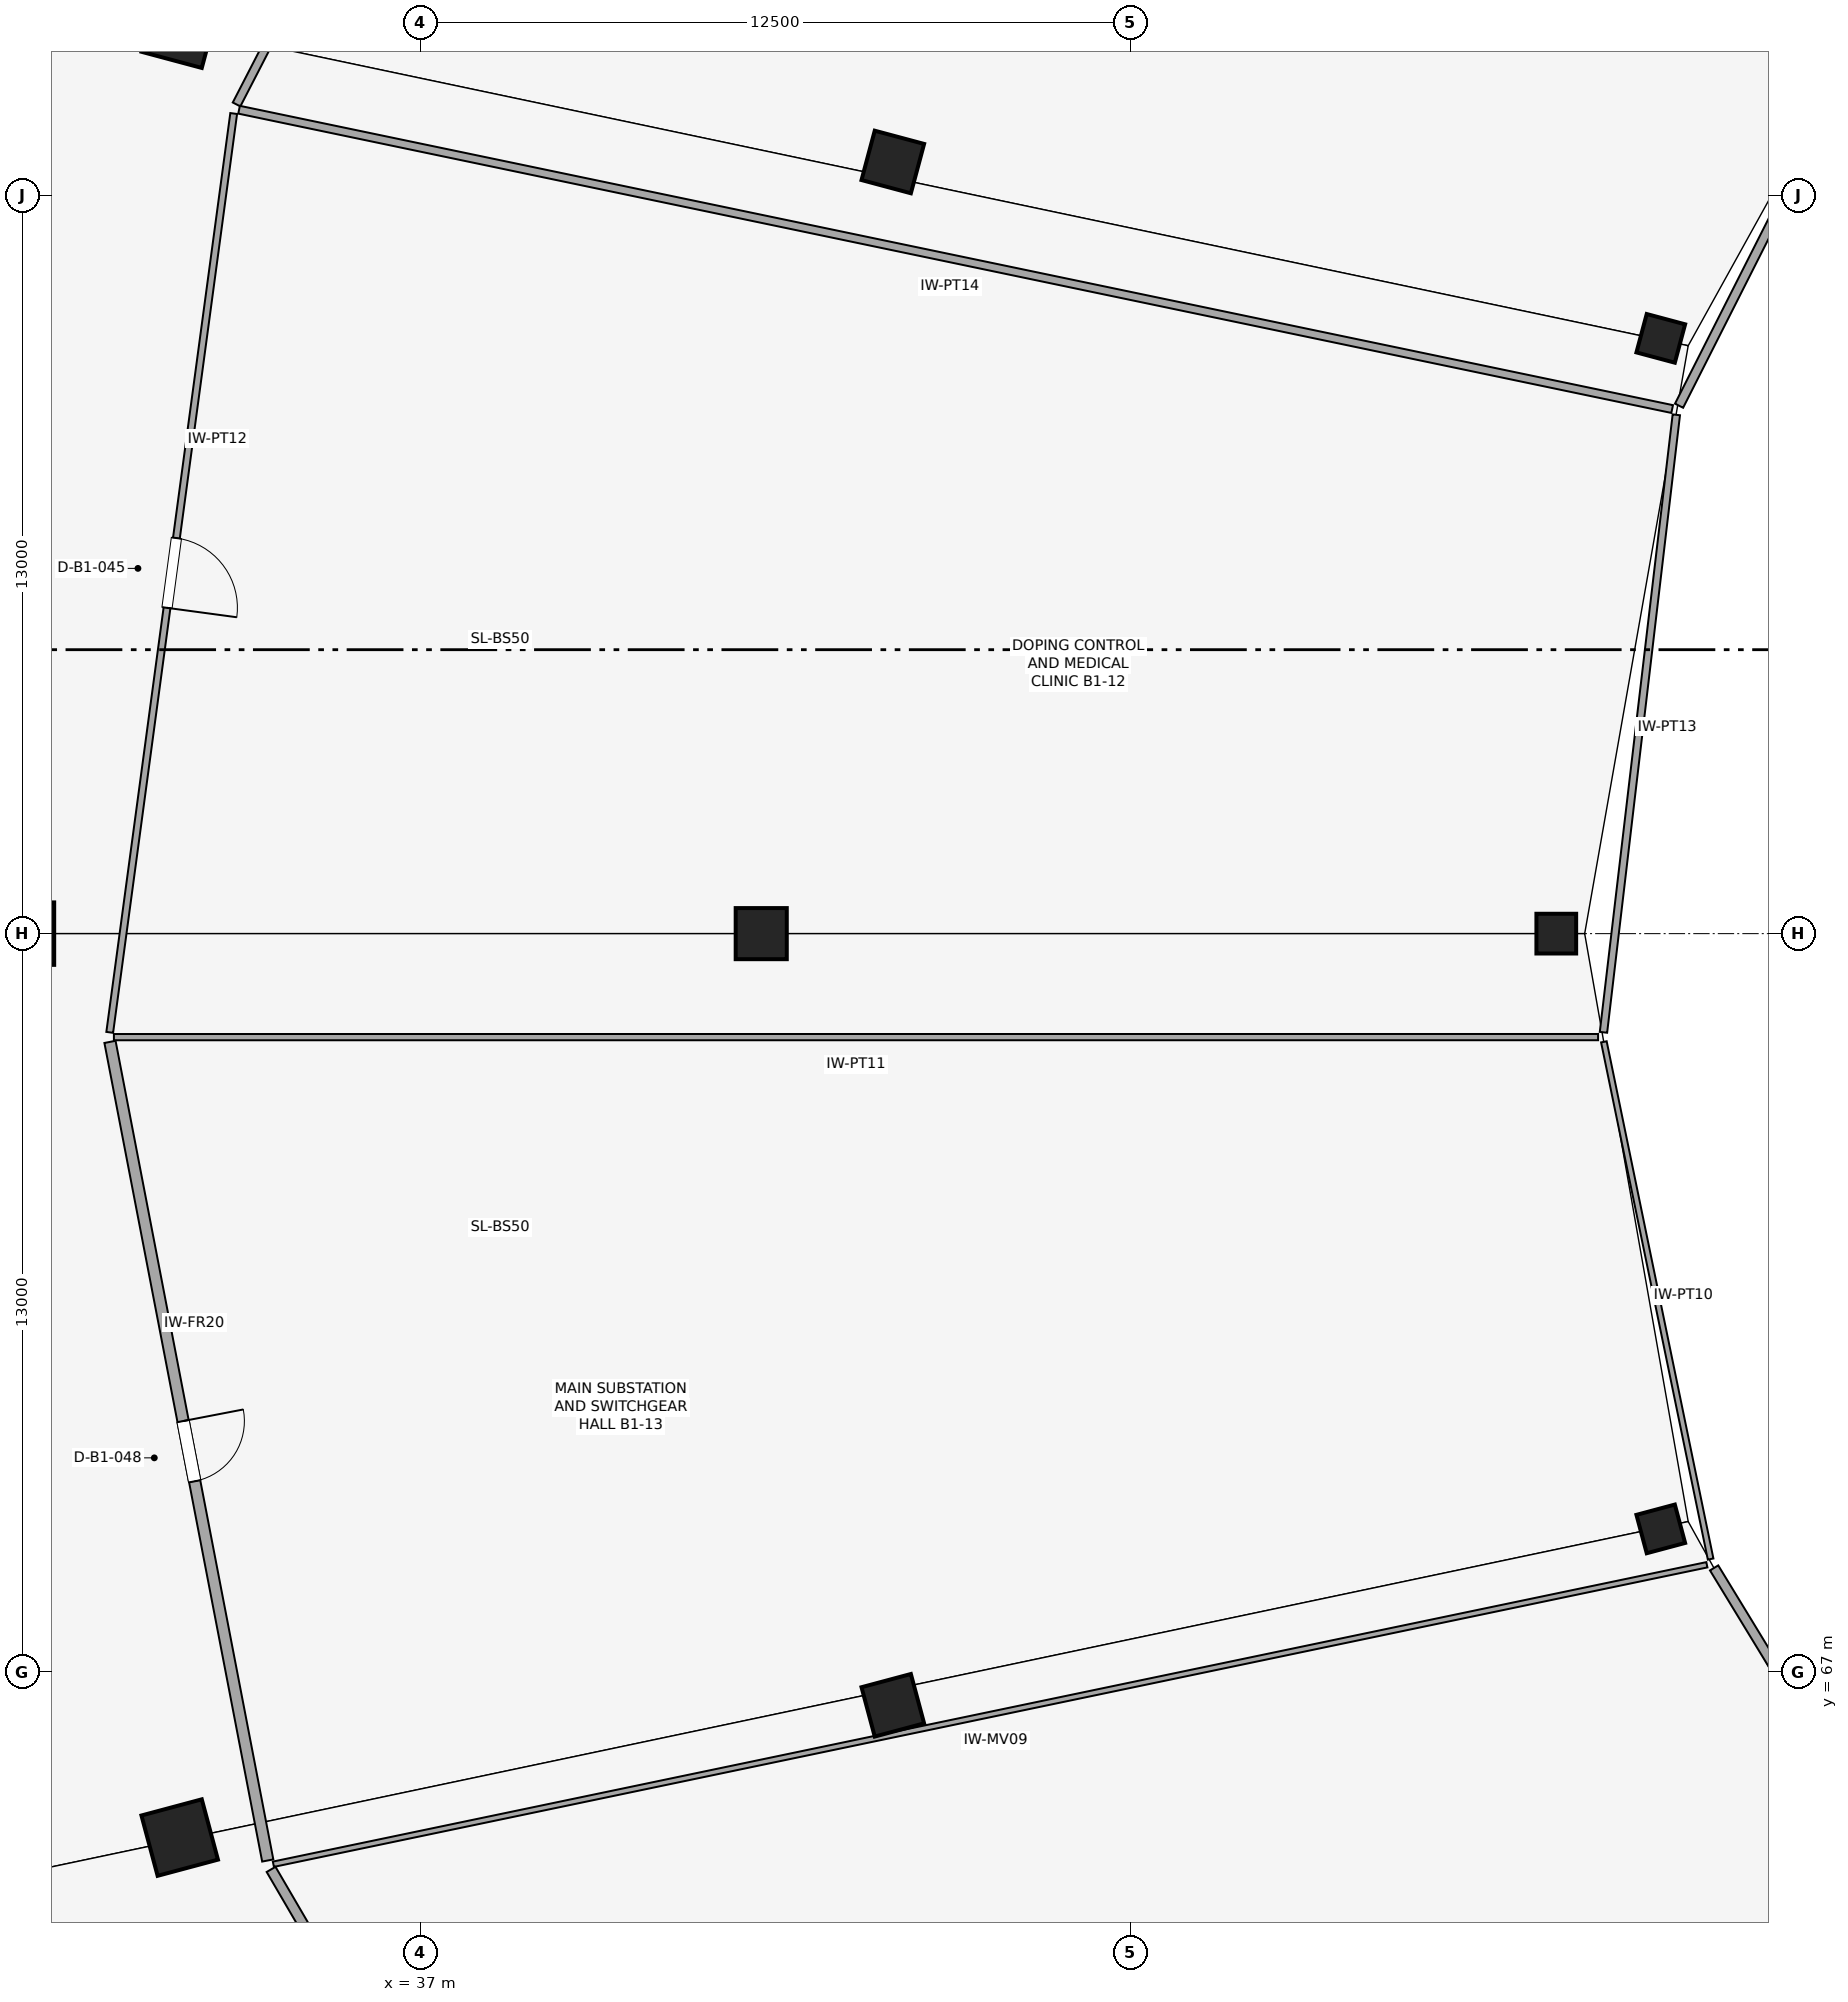
"""IFC4 building model, lengths in metres.
Left out: names, types, materials, properties, quantities, classifications, styles, units other than length and angle.
Written with IfcOpenShell. Run it as: python <this file> out.ifc"""

import sys

from ifc_helpers import new_model, si_unit, direction, frame, frame_2d, origin, origin_2d, place, context, subcontext, project, spatial, rectangle, extrude, element, fill, save


model = new_model("IFC4")
c1 = context("Model", 3, precision=1e-05, world=origin(), true_north=direction((0.0, 1.0)))
c2 = subcontext(c1, "Body", "Model", "MODEL_VIEW")
j1 = project(units=[si_unit("LENGTHUNIT", "METRE"), si_unit("PLANEANGLEUNIT", "RADIAN")], contexts=[c1])
p1 = place(None, origin())
s1 = spatial("IfcSite", under=j1, at=p1, CompositionType="ELEMENT")
p2 = place(p1, origin())
s2 = spatial("IfcBuilding", under=s1, at=p2, CompositionType="ELEMENT")
p3 = place(p2, frame((0.0, 0.0, -5.4)))
s3 = spatial("IfcBuildingStorey", under=s2, at=p3, CompositionType="ELEMENT", Elevation=-5.4)
for number, where, z_axis, x_axis in (
    (1, (58.84, 90.482, 0.0), (0.0, 0.0, 1.0), (-0.966, 0.259, 0.0)),
    (2, (57.0, 80.0, 0.0), (0.0, 0.0, 1.0), (-1.0, 0.0, 0.0)),
    (3, (58.84, 69.518, 0.0), (0.0, 0.0, 1.0), (-0.966, -0.259, 0.0)),
):
    element("IfcColumn", number, at=place(p3, frame(where, z_axis=z_axis, x_axis=x_axis)), inside=s3, PredefinedType="COLUMN", context=c2, shape_type="SweptSolid", body=[
        extrude(rectangle(XDim=0.7, YDim=0.7, at=origin_2d()), origin(), (0.0, 0.0, 1.0), 5.4),
    ])
for number, where, z_axis, x_axis in (
    (4, (45.317, 93.588, 0.0), (0.0, 0.0, 1.0), (-0.966, 0.259, 0.0)),
    (5, (43.0, 80.0, 0.0), (0.0, 0.0, 1.0), (-1.0, 0.0, 0.0)),
    (6, (45.317, 66.412, 0.0), (0.0, 0.0, 1.0), (-0.966, -0.259, 0.0)),
):
    element("IfcColumn", number, at=place(p3, frame(where, z_axis=z_axis, x_axis=x_axis)), inside=s3, PredefinedType="COLUMN", context=c2, shape_type="SweptSolid", body=[
        extrude(rectangle(XDim=0.9, YDim=0.9, at=origin_2d()), origin(), (0.0, 0.0, 1.0), 5.4),
    ])
for number, where, z_axis, x_axis in (
    (7, (32.76, 95.917, 0.0), (0.0, 0.0, 1.0), (-0.966, 0.259, 0.0)),
    (8, (30.0, 80.0, 0.0), (0.0, 0.0, 1.0), (-1.0, 0.0, 0.0)),
    (9, (32.76, 64.083, 0.0), (0.0, 0.0, 1.0), (-0.966, -0.259, 0.0)),
):
    element("IfcColumn", number, at=place(p3, frame(where, z_axis=z_axis, x_axis=x_axis)), inside=s3, PredefinedType="COLUMN", context=c2, shape_type="SweptSolid", body=[
        extrude(rectangle(XDim=1.1, YDim=1.1, at=origin_2d()), origin(), (0.0, 0.0, 1.0), 5.4),
    ])
p4 = place(p3, frame((63.563, 98.0, 0.0), z_axis=(0.0, 0.0, 1.0), x_axis=(-0.451234278817, -0.892405527561, 0.0)))
e10 = element("IfcWall", 10, at=p4, inside=s3, PredefinedType="PARTITIONING", context=c2, shape_type="SweptSolid", body=[
    extrude(rectangle(XDim=9.753, YDim=0.16, at=frame_2d((4.876, 0.0))), origin(), (0.0, 0.0, 1.0), 3.8),
])
p5 = place(p3, frame((40.797, 108.244, 0.0), z_axis=(0.0, 0.0, 1.0), x_axis=(-0.458369031368, -0.888761965367, 0.0)))
e11 = element("IfcWall", 11, at=p5, inside=s3, PredefinedType="PARTITIONING", context=c2, shape_type="SweptSolid", body=[
    extrude(rectangle(XDim=15.35, YDim=0.15, at=frame_2d((7.675, 0.0))), origin(), (0.0, 0.0, 1.0), 3.8),
])
p6 = place(p5, frame((7.165, 0.0, 0.0)))
e12 = element("IfcOpeningElement", 12, at=p6, cuts=e11, PredefinedType="OPENING", context=c2, shape_type="SweptSolid", body=[
    extrude(rectangle(XDim=1.02, YDim=2.38, at=frame_2d((0.51, 1.19))), frame((0.0, 0.085, 0.0), z_axis=(0.0, -1.0, 0.0), x_axis=(1.0, 0.0, 0.0)), (0.0, 0.0, 1.0), 0.17),
])
p7 = place(p3, frame((59.04, 89.238, 0.0), z_axis=(0.0, 0.0, 1.0), x_axis=(-0.978875817895, 0.204455699701, 0.0)))
e13 = element("IfcWall", 13, at=p7, inside=s3, PredefinedType="PARTITIONING", context=c2, shape_type="SweptSolid", body=[
    extrude(rectangle(XDim=25.78, YDim=0.14, at=frame_2d((12.89, 0.0))), origin(), (0.0, 0.0, 1.0), 3.8),
])
p8 = place(p3, frame((59.114, 89.136, 0.0), z_axis=(0.0, 0.0, 1.0), x_axis=(-0.117156923081, -0.993113415162, 0.0)))
e14 = element("IfcWall", 14, at=p8, inside=s3, PredefinedType="PARTITIONING", context=c2, shape_type="SweptSolid", body=[
    extrude(rectangle(XDim=10.949, YDim=0.13, at=frame_2d((5.474, 0.0))), origin(), (0.0, 0.0, 1.0), 3.8),
])
p9 = place(p3, frame((33.711, 94.441, 0.0), z_axis=(0.0, 0.0, 1.0), x_axis=(-0.133715075634, -0.991019817435, 0.0)))
e15 = element("IfcWall", 15, at=p9, inside=s3, PredefinedType="PARTITIONING", context=c2, shape_type="SweptSolid", body=[
    extrude(rectangle(XDim=16.327, YDim=0.12, at=frame_2d((8.163, 0.0))), origin(), (0.0, 0.0, 1.0), 3.8),
])
p10 = place(p9, frame((7.543, 0.0, 0.0)))
e16 = element("IfcOpeningElement", 16, at=p10, cuts=e15, PredefinedType="OPENING", context=c2, shape_type="SweptSolid", body=[
    extrude(rectangle(XDim=1.24, YDim=2.24, at=frame_2d((0.62, 1.12))), frame((0.0, 0.07, 0.0), z_axis=(0.0, -1.0, 0.0), x_axis=(1.0, 0.0, 0.0)), (0.0, 0.0, 1.0), 0.14),
])
p11 = place(p3, frame((57.736, 78.178, 0.0), z_axis=(0.0, 0.0, 1.0), x_axis=(-0.999999999607, -2.8025335e-05, 0.0)))
e17 = element("IfcWall", 17, at=p11, inside=s3, PredefinedType="PARTITIONING", context=c2, shape_type="SweptSolid", body=[
    extrude(rectangle(XDim=26.134, YDim=0.11, at=frame_2d((13.067, 0.0))), origin(), (0.0, 0.0, 1.0), 3.8),
])
p12 = place(p3, frame((57.838, 78.095, 0.0), z_axis=(0.0, 0.0, 1.0), x_axis=(0.202140289415, -0.979356576225, 0.0)))
e18 = element("IfcWall", 18, at=p12, inside=s3, PredefinedType="PARTITIONING", context=c2, shape_type="SweptSolid", body=[
    extrude(rectangle(XDim=9.3, YDim=0.1, at=frame_2d((4.65, 0.0))), origin(), (0.0, 0.0, 1.0), 3.8),
])
p13 = place(p3, frame((31.533, 78.094, 0.0), z_axis=(0.0, 0.0, 1.0), x_axis=(0.189225499552, -0.981933658818, 0.0)))
e19 = element("IfcWall", 19, at=p13, inside=s3, PredefinedType="PARTITIONING", context=c2, shape_type="SweptSolid", body=[
    extrude(rectangle(XDim=14.68, YDim=0.2, at=frame_2d((7.34, 0.0))), origin(), (0.0, 0.0, 1.0), 3.8),
])
p14 = place(p13, frame((6.8, 0.0, 0.0)))
e20 = element("IfcOpeningElement", 20, at=p14, cuts=e19, PredefinedType="OPENING", context=c2, shape_type="SweptSolid", body=[
    extrude(rectangle(XDim=1.08, YDim=2.1, at=frame_2d((0.54, 1.05))), frame((0.0, 0.11, 0.0), z_axis=(0.0, -1.0, 0.0), x_axis=(1.0, 0.0, 0.0)), (0.0, 0.0, 1.0), 0.22),
])
p15 = place(p3, frame((59.652, 68.886, 0.0), z_axis=(0.0, 0.0, 1.0), x_axis=(-0.978866055155, -0.204502435355, 0.0)))
e21 = element("IfcWall", 21, at=p15, inside=s3, PredefinedType="MOVABLE", context=c2, shape_type="SweptSolid", body=[
    extrude(rectangle(XDim=25.787, YDim=0.095, at=frame_2d((12.893, 0.0))), origin(), (0.0, 0.0, 1.0), 3.8),
])
p16 = place(p3, frame((59.779, 68.831, 0.0), z_axis=(0.0, 0.0, 1.0), x_axis=(0.52048815538, -0.853868889297, 0.0)))
e22 = element("IfcWall", 22, at=p16, inside=s3, PredefinedType="PARTITIONING", context=c2, shape_type="SweptSolid", body=[
    extrude(rectangle(XDim=11.647, YDim=0.17, at=frame_2d((5.823, 0.0))), origin(), (0.0, 0.0, 1.0), 3.8),
])
p17 = place(p3, frame((34.369, 63.522, 0.0), z_axis=(0.0, 0.0, 1.0), x_axis=(0.50388511134, -0.863770684019, 0.0)))
e23 = element("IfcWall", 23, at=p17, inside=s3, PredefinedType="PARTITIONING", context=c2, shape_type="SweptSolid", body=[
    extrude(rectangle(XDim=17.242, YDim=0.18, at=frame_2d((8.621, 0.0))), origin(), (0.0, 0.0, 1.0), 3.8),
])
p18 = place(p17, frame((8.081, 0.0, 0.0)))
e24 = element("IfcOpeningElement", 24, at=p18, cuts=e23, PredefinedType="OPENING", context=c2, shape_type="SweptSolid", body=[
    extrude(rectangle(XDim=1.08, YDim=2.38, at=frame_2d((0.54, 1.19))), frame((0.0, 0.1, 0.0), z_axis=(0.0, -1.0, 0.0), x_axis=(1.0, 0.0, 0.0)), (0.0, 0.0, 1.0), 0.2),
])
p19 = place(p10, origin())
e25 = element("IfcDoor", 25, at=p19, inside=s3, OperationType="SINGLE_SWING_RIGHT", PredefinedType="DOOR", context=c2, shape_type="SweptSolid", body=[
    extrude(rectangle(XDim=1.24, YDim=2.24, at=frame_2d((0.62, 1.12))), frame((0.0, 0.025, 0.0), z_axis=(0.0, -1.0, 0.0), x_axis=(1.0, 0.0, 0.0)), (0.0, 0.0, 1.0), 0.05),
])
fill(e16, e25)
p20 = place(p14, origin())
e26 = element("IfcDoor", 26, at=p20, inside=s3, OperationType="SINGLE_SWING_LEFT", PredefinedType="DOOR", context=c2, shape_type="SweptSolid", body=[
    extrude(rectangle(XDim=1.08, YDim=2.1, at=frame_2d((0.54, 1.05))), frame((0.0, 0.025, 0.0), z_axis=(0.0, -1.0, 0.0), x_axis=(1.0, 0.0, 0.0)), (0.0, 0.0, 1.0), 0.05),
])
fill(e20, e26)
save(model, sys.argv[1])
